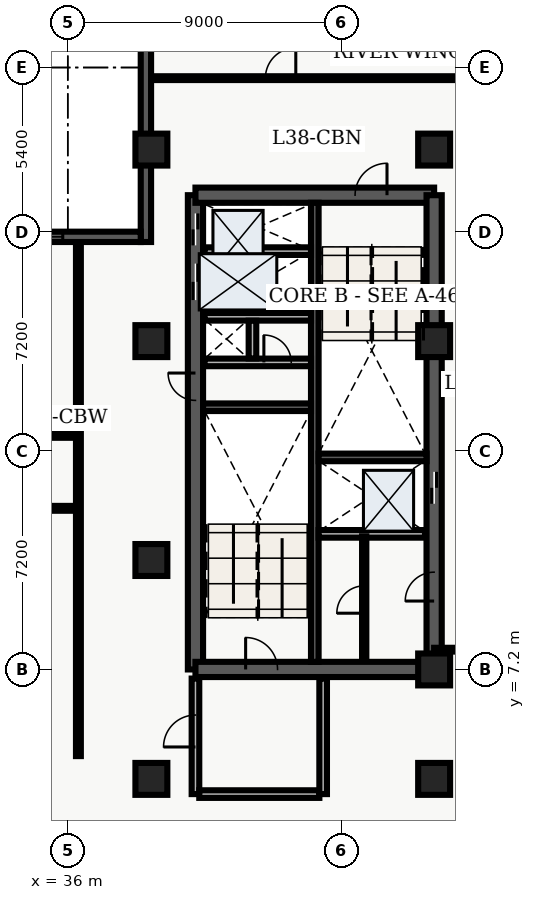
"""IFC4 building model, lengths in metres.
Left out: names, types, materials, properties, quantities, classifications, styles, units other than length and angle.
Written with IfcOpenShell. Run it as: python <this file> out.ifc"""

import sys

from ifc_helpers import new_model, entity, si_unit, converted_unit, direction, frame, origin_with_axes, origin_2d_with_axis, place, context, subcontext, project, spatial, polyline, rectangle, outline, extrude, element, fill, save


model = new_model("IFC4")
c1 = context("Model", 3, precision=1e-05, world=origin_with_axes(), true_north=direction((0.0, 1.0)))
c2 = subcontext(c1, "Body", "Model", "MODEL_VIEW")
j1 = project(units=[si_unit("LENGTHUNIT", "METRE"), converted_unit("PLANEANGLEUNIT", "DEGREE", entity("IfcPlaneAngleMeasure", 0.017), si_unit("PLANEANGLEUNIT", "RADIAN"), dimensions=[0, 0, 0, 0, 0, 0, 0])], contexts=[c1])
p1 = place(None, origin_with_axes())
s1 = spatial("IfcSite", under=j1, at=p1, CompositionType="ELEMENT")
p2 = place(p1, origin_with_axes())
s2 = spatial("IfcBuilding", under=s1, at=p2, CompositionType="ELEMENT")
p3 = place(p2, frame((0.0, 0.0, 156.3), z_axis=(0.0, 0.0, 1.0), x_axis=(1.0, 0.0, 0.0)))
s3 = spatial("IfcBuildingStorey", under=s2, at=p3, CompositionType="ELEMENT", Elevation=156.3)
p4 = place(p3, frame((40.2, 7.2, 0.0), z_axis=(0.0, 0.0, 1.0), x_axis=(0.0, 1.0, 0.0)))
e1 = element("IfcWall", 1, at=p4, inside=s3, PredefinedType="SHEAR", context=c2, shape_type="SweptSolid", body=[
    extrude(outline(polyline([(0.0, -0.25), (15.6, -0.25), (15.6, 0.25), (0.0, 0.25), (0.0, -0.25)])), origin_with_axes(), (0.0, 0.0, 1.0), 3.66),
])
p5 = place(p4, frame((14.475, 0.0, 0.0), z_axis=(0.0, 0.0, 1.0), x_axis=(1.0, 0.0, 0.0)))
e2 = element("IfcOpeningElement", 2, at=p5, cuts=e1, PredefinedType="OPENING", context=c2, shape_type="SweptSolid", body=[
    extrude(rectangle(XDim=1.05, YDim=0.52, at=origin_2d_with_axis()), origin_with_axes(), (0.0, 0.0, 1.0), 2.15),
])
p6 = place(p4, frame((12.75, 0.0, 0.0), z_axis=(0.0, 0.0, 1.0), x_axis=(1.0, 0.0, 0.0)))
e3 = element("IfcOpeningElement", 3, at=p6, cuts=e1, PredefinedType="OPENING", context=c2, shape_type="SweptSolid", body=[
    extrude(rectangle(XDim=1.2, YDim=0.52, at=origin_2d_with_axis()), origin_with_axes(), (0.0, 0.0, 1.0), 2.15),
])
p7 = place(p4, frame((9.3, 0.0, 0.0), z_axis=(0.0, 0.0, 1.0), x_axis=(1.0, 0.0, 0.0)))
e4 = element("IfcOpeningElement", 4, at=p7, cuts=e1, PredefinedType="OPENING", context=c2, shape_type="SweptSolid", body=[
    extrude(rectangle(XDim=0.9, YDim=0.52, at=origin_2d_with_axis()), origin_with_axes(), (0.0, 0.0, 1.0), 2.15),
])
p8 = place(p3, frame((40.2, 7.2, 0.0), z_axis=(0.0, 0.0, 1.0), x_axis=(1.0, 0.0, 0.0)))
e5 = element("IfcWall", 5, at=p8, inside=s3, PredefinedType="SHEAR", context=c2, shape_type="SweptSolid", body=[
    extrude(outline(polyline([(0.0, -0.25), (7.85, -0.25), (7.85, 0.25), (0.0, 0.25), (0.0, -0.25)])), origin_with_axes(), (0.0, 0.0, 1.0), 3.66),
])
p9 = place(p8, frame((2.175, 0.0, 0.0), z_axis=(0.0, 0.0, 1.0), x_axis=(1.0, 0.0, 0.0)))
e6 = element("IfcOpeningElement", 6, at=p9, cuts=e5, PredefinedType="OPENING", context=c2, shape_type="SweptSolid", body=[
    extrude(rectangle(XDim=1.05, YDim=0.52, at=origin_2d_with_axis()), origin_with_axes(), (0.0, 0.0, 1.0), 2.15),
])
p10 = place(p3, frame((40.2, 22.8, 0.0), z_axis=(0.0, 0.0, 1.0), x_axis=(1.0, 0.0, 0.0)))
e7 = element("IfcWall", 7, at=p10, inside=s3, PredefinedType="SHEAR", context=c2, shape_type="SweptSolid", body=[
    extrude(outline(polyline([(0.0, -0.25), (7.85, -0.25), (7.85, 0.25), (0.0, 0.25), (0.0, -0.25)])), origin_with_axes(), (0.0, 0.0, 1.0), 3.66),
])
p11 = place(p10, frame((5.775, 0.0, 0.0), z_axis=(0.0, 0.0, 1.0), x_axis=(1.0, 0.0, 0.0)))
e8 = element("IfcOpeningElement", 8, at=p11, cuts=e7, PredefinedType="OPENING", context=c2, shape_type="SweptSolid", body=[
    extrude(rectangle(XDim=1.05, YDim=0.52, at=origin_2d_with_axis()), origin_with_axes(), (0.0, 0.0, 1.0), 2.15),
])
p12 = place(p3, frame((48.05, 7.2, 0.0), z_axis=(0.0, 0.0, 1.0), x_axis=(0.0, 1.0, 0.0)))
e9 = element("IfcWall", 9, at=p12, inside=s3, PredefinedType="SHEAR", context=c2, shape_type="SweptSolid", body=[
    extrude(outline(polyline([(0.0, -0.25), (15.6, -0.25), (15.6, 0.25), (0.0, 0.25), (0.0, -0.25)])), origin_with_axes(), (0.0, 0.0, 1.0), 3.66),
])
p13 = place(p12, frame((5.975, 0.0, 0.0), z_axis=(0.0, 0.0, 1.0), x_axis=(1.0, 0.0, 0.0)))
e10 = element("IfcOpeningElement", 10, at=p13, cuts=e9, PredefinedType="OPENING", context=c2, shape_type="SweptSolid", body=[
    extrude(rectangle(XDim=1.05, YDim=0.52, at=origin_2d_with_axis()), origin_with_axes(), (0.0, 0.0, 1.0), 2.15),
])
p14 = place(p12, frame((2.725, 0.0, 0.0), z_axis=(0.0, 0.0, 1.0), x_axis=(1.0, 0.0, 0.0)))
e11 = element("IfcOpeningElement", 11, at=p14, cuts=e9, PredefinedType="OPENING", context=c2, shape_type="SweptSolid", body=[
    extrude(rectangle(XDim=0.95, YDim=0.52, at=origin_2d_with_axis()), origin_with_axes(), (0.0, 0.0, 1.0), 2.15),
])
p15 = place(p3, frame((44.125, 7.45, 0.0), z_axis=(0.0, 0.0, 1.0), x_axis=(0.0, 1.0, 0.0)))
e12 = element("IfcWall", 12, at=p15, inside=s3, PredefinedType="SHEAR", context=c2, shape_type="SweptSolid", body=[
    extrude(outline(polyline([(0.0, -0.125), (15.1, -0.125), (15.1, 0.125), (0.0, 0.125), (0.0, -0.125)])), origin_with_axes(), (0.0, 0.0, 1.0), 3.66),
])
for number, where, z_axis, x_axis in (
    (13, (40.45, 15.825, 0.0), (0.0, 0.0, 1.0), (1.0, 0.0, 0.0)),
    (14, (44.25, 14.175, 0.0), (0.0, 0.0, 1.0), (1.0, 0.0, 0.0)),
):
    element("IfcWall", number, at=place(p3, frame(where, z_axis=z_axis, x_axis=x_axis)), inside=s3, PredefinedType="SHEAR", context=c2, shape_type="SweptSolid", body=[
        extrude(outline(polyline([(0.0, -0.125), (3.55, -0.125), (3.55, 0.125), (0.0, 0.125), (0.0, -0.125)])), origin_with_axes(), (0.0, 0.0, 1.0), 3.66),
    ])
p16 = place(p3, frame((40.5, 17.3, 0.0), z_axis=(0.0, 0.0, 1.0), x_axis=(1.0, 0.0, 0.0)))
e15 = element("IfcWall", 15, at=p16, inside=s3, PredefinedType="SOLIDWALL", context=c2, shape_type="SweptSolid", body=[
    extrude(outline(polyline([(0.0, -0.125), (3.5, -0.125), (3.5, 0.125), (0.0, 0.125), (0.0, -0.125)])), origin_with_axes(), (0.0, 0.0, 1.0), 2.7),
])
p17 = place(p16, frame((2.4, 0.0, 0.0), z_axis=(0.0, 0.0, 1.0), x_axis=(1.0, 0.0, 0.0)))
e16 = element("IfcOpeningElement", 16, at=p17, cuts=e15, PredefinedType="OPENING", context=c2, shape_type="SweptSolid", body=[
    extrude(rectangle(XDim=0.9, YDim=0.27, at=origin_2d_with_axis()), origin_with_axes(), (0.0, 0.0, 1.0), 2.15),
])
p18 = place(p3, frame((40.5, 18.8, 0.0), z_axis=(0.0, 0.0, 1.0), x_axis=(1.0, 0.0, 0.0)))
e17 = element("IfcWall", 17, at=p18, inside=s3, PredefinedType="SOLIDWALL", context=c2, shape_type="SweptSolid", body=[
    extrude(outline(polyline([(0.0, -0.125), (3.5, -0.125), (3.5, 0.125), (0.0, 0.125), (0.0, -0.125)])), origin_with_axes(), (0.0, 0.0, 1.0), 2.7),
])
p19 = place(p3, frame((42.075, 17.43, 0.0), z_axis=(0.0, 0.0, 1.0), x_axis=(0.0, 1.0, 0.0)))
e18 = element("IfcWall", 18, at=p19, inside=s3, PredefinedType="SOLIDWALL", context=c2, shape_type="SweptSolid", body=[
    extrude(outline(polyline([(0.0, -0.125), (1.24, -0.125), (1.24, 0.125), (0.0, 0.125), (0.0, -0.125)])), origin_with_axes(), (0.0, 0.0, 1.0), 2.7),
])
p20 = place(p3, frame((40.2, 3.1, 0.0), z_axis=(0.0, 0.0, 1.0), x_axis=(0.0, 1.0, 0.0)))
e19 = element("IfcWall", 19, at=p20, inside=s3, PredefinedType="SOLIDWALL", context=c2, shape_type="SweptSolid", body=[
    extrude(outline(polyline([(0.0, -0.125), (3.8, -0.125), (3.8, 0.125), (0.0, 0.125), (0.0, -0.125)])), origin_with_axes(), (0.0, 0.0, 1.0), 2.7),
])
p21 = place(p20, frame((2.075, 0.0, 0.0), z_axis=(0.0, 0.0, 1.0), x_axis=(1.0, 0.0, 0.0)))
e20 = element("IfcOpeningElement", 20, at=p21, cuts=e19, PredefinedType="OPENING", context=c2, shape_type="SweptSolid", body=[
    extrude(rectangle(XDim=1.05, YDim=0.27, at=origin_2d_with_axis()), origin_with_axes(), (0.0, 0.0, 1.0), 2.15),
])
p22 = place(p3, frame((40.325, 3.1, 0.0), z_axis=(0.0, 0.0, 1.0), x_axis=(1.0, 0.0, 0.0)))
e21 = element("IfcWall", 21, at=p22, inside=s3, PredefinedType="SOLIDWALL", context=c2, shape_type="SweptSolid", body=[
    extrude(outline(polyline([(0.0, -0.125), (3.95, -0.125), (3.95, 0.125), (0.0, 0.125), (0.0, -0.125)])), origin_with_axes(), (0.0, 0.0, 1.0), 2.7),
])
p23 = place(p3, frame((44.4, 3.1, 0.0), z_axis=(0.0, 0.0, 1.0), x_axis=(0.0, 1.0, 0.0)))
e22 = element("IfcWall", 22, at=p23, inside=s3, PredefinedType="SOLIDWALL", context=c2, shape_type="SweptSolid", body=[
    extrude(outline(polyline([(0.0, -0.125), (3.8, -0.125), (3.8, 0.125), (0.0, 0.125), (0.0, -0.125)])), origin_with_axes(), (0.0, 0.0, 1.0), 2.7),
])
for number, where, z_axis, x_axis in (
    (23, (38.75, 3.6, 0.0), (0.0, 0.0, 1.0), (1.0, 0.0, 0.0)),
    (24, (38.75, 10.8, 0.0), (0.0, 0.0, 1.0), (1.0, 0.0, 0.0)),
    (25, (38.75, 18.0, 0.0), (0.0, 0.0, 1.0), (1.0, 0.0, 0.0)),
    (26, (38.75, 24.3, 0.0), (0.0, 0.0, 1.0), (1.0, 0.0, 0.0)),
    (27, (48.05, 3.6, 0.0), (0.0, 0.0, 1.0), (1.0, 0.0, 0.0)),
    (28, (48.05, 7.2, 0.0), (0.0, 0.0, 1.0), (1.0, 0.0, 0.0)),
    (29, (48.05, 18.0, 0.0), (0.0, 0.0, 1.0), (1.0, 0.0, 0.0)),
    (30, (48.05, 24.3, 0.0), (0.0, 0.0, 1.0), (1.0, 0.0, 0.0)),
):
    element("IfcColumn", number, at=place(p3, frame(where, z_axis=z_axis, x_axis=x_axis)), inside=s3, PredefinedType="COLUMN", context=c2, shape_type="SweptSolid", body=[
        extrude(rectangle(XDim=1.05, YDim=1.05, at=origin_2d_with_axis()), origin_with_axes(), (0.0, 0.0, 1.0), 3.9),
    ])
for number, where, z_axis, x_axis in (
    (31, (40.5, 20.96, 0.0), (0.0, 0.0, 1.0), (1.0, 0.0, 0.0)),
    (32, (44.25, 11.66, 0.0), (0.0, 0.0, 1.0), (1.0, 0.0, 0.0)),
):
    element("IfcWall", number, at=place(p3, frame(where, z_axis=z_axis, x_axis=x_axis)), inside=s3, PredefinedType="SOLIDWALL", context=c2, shape_type="SweptSolid", body=[
        extrude(outline(polyline([(0.0, -0.125), (3.5, -0.125), (3.5, 0.125), (0.0, 0.125), (0.0, -0.125)])), origin_with_axes(), (0.0, 0.0, 1.0), 2.7),
    ])
p24 = place(p3, frame((45.75, 7.5, 0.0), z_axis=(0.0, 0.0, 1.0), x_axis=(0.0, 1.0, 0.0)))
e33 = element("IfcWall", 33, at=p24, inside=s3, PredefinedType="PARTITIONING", context=c2, shape_type="SweptSolid", body=[
    extrude(outline(polyline([(0.0, -0.07), (4.08, -0.07), (4.08, 0.07), (0.0, 0.07), (0.0, -0.07)])), origin_with_axes(), (0.0, 0.0, 1.0), 2.7),
])
p25 = place(p24, frame((2.0, 0.0, 0.0), z_axis=(0.0, 0.0, 1.0), x_axis=(1.0, 0.0, 0.0)))
e34 = element("IfcOpeningElement", 34, at=p25, cuts=e33, PredefinedType="OPENING", context=c2, shape_type="SweptSolid", body=[
    extrude(rectangle(XDim=0.9, YDim=0.16, at=origin_2d_with_axis()), origin_with_axes(), (0.0, 0.0, 1.0), 2.15),
])
p26 = place(p3, frame((21.15, 12.5, 0.0), z_axis=(0.0, 0.0, 1.0), x_axis=(1.0, 0.0, 0.0)))
e35 = element("IfcWall", 35, at=p26, inside=s3, PredefinedType="PARTITIONING", context=c2, shape_type="SweptSolid", body=[
    extrude(outline(polyline([(0.0, -0.08), (15.2, -0.08), (15.2, 0.08), (0.0, 0.08), (0.0, -0.08)])), origin_with_axes(), (0.0, 0.0, 1.0), 2.7),
])
p27 = place(p26, frame((2.276, 0.0, 0.0), z_axis=(0.0, 0.0, 1.0), x_axis=(1.0, 0.0, 0.0)))
e36 = element("IfcOpeningElement", 36, at=p27, cuts=e35, PredefinedType="OPENING", context=c2, shape_type="SweptSolid", body=[
    extrude(rectangle(XDim=1.0, YDim=0.18, at=origin_2d_with_axis()), origin_with_axes(), (0.0, 0.0, 1.0), 2.15),
])
p28 = place(p26, frame((6.824, 0.0, 0.0), z_axis=(0.0, 0.0, 1.0), x_axis=(1.0, 0.0, 0.0)))
e37 = element("IfcOpeningElement", 37, at=p28, cuts=e35, PredefinedType="OPENING", context=c2, shape_type="SweptSolid", body=[
    extrude(rectangle(XDim=1.0, YDim=0.18, at=origin_2d_with_axis()), origin_with_axes(), (0.0, 0.0, 1.0), 2.15),
])
p29 = place(p26, frame((12.198, 0.0, 0.0), z_axis=(0.0, 0.0, 1.0), x_axis=(1.0, 0.0, 0.0)))
e38 = element("IfcOpeningElement", 38, at=p29, cuts=e35, PredefinedType="OPENING", context=c2, shape_type="SweptSolid", body=[
    extrude(rectangle(XDim=1.2, YDim=0.18, at=origin_2d_with_axis()), origin_with_axes(), (0.0, 0.0, 1.0), 2.2),
])
p30 = place(p3, frame((21.15, 14.9, 0.0), z_axis=(0.0, 0.0, 1.0), x_axis=(1.0, 0.0, 0.0)))
e39 = element("IfcWall", 39, at=p30, inside=s3, PredefinedType="PARTITIONING", context=c2, shape_type="SweptSolid", body=[
    extrude(outline(polyline([(0.0, -0.08), (15.2, -0.08), (15.2, 0.08), (0.0, 0.08), (0.0, -0.08)])), origin_with_axes(), (0.0, 0.0, 1.0), 2.7),
])
p31 = place(p30, frame((3.506, 0.0, 0.0), z_axis=(0.0, 0.0, 1.0), x_axis=(1.0, 0.0, 0.0)))
e40 = element("IfcOpeningElement", 40, at=p31, cuts=e39, PredefinedType="OPENING", context=c2, shape_type="SweptSolid", body=[
    extrude(rectangle(XDim=1.0, YDim=0.18, at=origin_2d_with_axis()), origin_with_axes(), (0.0, 0.0, 1.0), 2.15),
])
p32 = place(p30, frame((10.976, 0.0, 0.0), z_axis=(0.0, 0.0, 1.0), x_axis=(1.0, 0.0, 0.0)))
e41 = element("IfcOpeningElement", 41, at=p32, cuts=e39, PredefinedType="OPENING", context=c2, shape_type="SweptSolid", body=[
    extrude(rectangle(XDim=1.0, YDim=0.18, at=origin_2d_with_axis()), origin_with_axes(), (0.0, 0.0, 1.0), 2.15),
])
p33 = place(p3, frame((36.35, 4.35, 0.0), z_axis=(0.0, 0.0, 1.0), x_axis=(0.0, 1.0, 0.0)))
e42 = element("IfcWall", 42, at=p33, inside=s3, PredefinedType="PARTITIONING", context=c2, shape_type="SweptSolid", body=[
    extrude(outline(polyline([(0.0, -0.08), (16.95, -0.08), (16.95, 0.08), (0.0, 0.08), (0.0, -0.08)])), origin_with_axes(), (0.0, 0.0, 1.0), 2.7),
])
p34 = place(p3, frame((59.665, 7.85, 0.0), z_axis=(0.0, 0.0, 1.0), x_axis=(-1.0, 0.0, 0.0)))
e43 = element("IfcWall", 43, at=p34, inside=s3, PredefinedType="PARTITIONING", context=c2, shape_type="SweptSolid", body=[
    extrude(outline(polyline([(0.0, -0.062), (11.615, -0.062), (11.615, 0.062), (0.0, 0.062), (0.0, -0.062)])), origin_with_axes(), (0.0, 0.0, 1.0), 2.7),
])
p35 = place(p34, frame((10.315, 0.0, 0.0), z_axis=(0.0, 0.0, 1.0), x_axis=(1.0, 0.0, 0.0)))
e44 = element("IfcOpeningElement", 44, at=p35, cuts=e43, PredefinedType="OPENING", context=c2, shape_type="SweptSolid", body=[
    extrude(rectangle(XDim=1.0, YDim=0.145, at=origin_2d_with_axis()), origin_with_axes(), (0.0, 0.0, 1.0), 2.15),
])
p36 = place(p3, frame((38.735, 26.65, 0.0), z_axis=(0.0, 0.0, 1.0), x_axis=(1.0, 0.0, 0.0)))
e45 = element("IfcWall", 45, at=p36, inside=s3, PredefinedType="PARTITIONING", context=c2, shape_type="SweptSolid", body=[
    extrude(outline(polyline([(0.0, -0.062), (20.905, -0.062), (20.905, 0.062), (0.0, 0.062), (0.0, -0.062)])), origin_with_axes(), (0.0, 0.0, 1.0), 2.7),
])
p37 = place(p36, frame((4.265, 0.0, 0.0), z_axis=(0.0, 0.0, 1.0), x_axis=(1.0, 0.0, 0.0)))
e46 = element("IfcOpeningElement", 46, at=p37, cuts=e45, PredefinedType="OPENING", context=c2, shape_type="SweptSolid", body=[
    extrude(rectangle(XDim=1.0, YDim=0.145, at=origin_2d_with_axis()), origin_with_axes(), (0.0, 0.0, 1.0), 2.15),
])
p38 = place(p3, frame((38.57, 21.26, 0.0), z_axis=(0.0, 0.0, 1.0), x_axis=(0.0, 1.0, 0.0)))
e47 = element("IfcWall", 47, at=p38, inside=s3, PredefinedType="SOLIDWALL", context=c2, shape_type="SweptSolid", body=[
    extrude(outline(polyline([(0.0, -0.17), (7.54, -0.17), (7.54, 0.17), (0.0, 0.17), (0.0, -0.17)])), origin_with_axes(), (0.0, 0.0, 1.0), 3.66),
])
p39 = place(p3, frame((22.712, 21.43, 0.0), z_axis=(0.0, 0.0, 1.0), x_axis=(1.0, 0.0, 0.0)))
e48 = element("IfcWall", 48, at=p39, inside=s3, PredefinedType="SOLIDWALL", context=c2, shape_type="SweptSolid", body=[
    extrude(outline(polyline([(0.0, -0.17), (15.688, -0.17), (15.688, 0.17), (0.0, 0.17), (0.0, -0.17)])), origin_with_axes(), (0.0, 0.0, 1.0), 3.66),
])
p40 = place(p39, frame((3.015, 0.0, 0.45), z_axis=(0.0, 0.0, 1.0), x_axis=(1.0, 0.0, 0.0)))
e49 = element("IfcOpeningElement", 49, at=p40, cuts=e48, PredefinedType="OPENING", context=c2, shape_type="SweptSolid", body=[
    extrude(rectangle(XDim=1.8, YDim=0.36, at=origin_2d_with_axis()), origin_with_axes(), (0.0, 0.0, 1.0), 2.1),
])
p41 = place(p39, frame((7.844, 0.0, 0.45), z_axis=(0.0, 0.0, 1.0), x_axis=(1.0, 0.0, 0.0)))
e50 = element("IfcOpeningElement", 50, at=p41, cuts=e48, PredefinedType="OPENING", context=c2, shape_type="SweptSolid", body=[
    extrude(rectangle(XDim=1.8, YDim=0.36, at=origin_2d_with_axis()), origin_with_axes(), (0.0, 0.0, 1.0), 2.1),
])
p42 = place(p39, frame((12.223, 0.0, 0.45), z_axis=(0.0, 0.0, 1.0), x_axis=(1.0, 0.0, 0.0)))
e51 = element("IfcOpeningElement", 51, at=p42, cuts=e48, PredefinedType="OPENING", context=c2, shape_type="SweptSolid", body=[
    extrude(rectangle(XDim=1.8, YDim=0.36, at=origin_2d_with_axis()), origin_with_axes(), (0.0, 0.0, 1.0), 2.1),
])
p43 = place(p12, frame((5.975, 0.0, 0.0), z_axis=(0.0, 0.0, 1.0), x_axis=(1.0, 0.0, 0.0)))
e52 = element("IfcDoor", 52, at=p43, inside=s3, OperationType="SLIDING_TO_LEFT", PredefinedType="DOOR", context=c2, shape_type="SweptSolid", body=[
    extrude(rectangle(XDim=1.05, YDim=0.09, at=origin_2d_with_axis()), origin_with_axes(), (0.0, 0.0, 1.0), 2.15),
])
fill(e10, e52)
p44 = place(p4, frame((14.475, 0.0, 0.0), z_axis=(0.0, 0.0, 1.0), x_axis=(1.0, 0.0, 0.0)))
e53 = element("IfcDoor", 53, at=p44, inside=s3, OperationType="SLIDING_TO_RIGHT", PredefinedType="DOOR", context=c2, shape_type="SweptSolid", body=[
    extrude(rectangle(XDim=1.05, YDim=0.09, at=origin_2d_with_axis()), origin_with_axes(), (0.0, 0.0, 1.0), 2.15),
])
fill(e2, e53)
p45 = place(p4, frame((12.75, 0.0, 0.0), z_axis=(0.0, 0.0, 1.0), x_axis=(1.0, 0.0, 0.0)))
e54 = element("IfcDoor", 54, at=p45, inside=s3, OperationType="DOUBLE_DOOR_SLIDING", PredefinedType="DOOR", context=c2, shape_type="SweptSolid", body=[
    extrude(rectangle(XDim=1.2, YDim=0.09, at=origin_2d_with_axis()), origin_with_axes(), (0.0, 0.0, 1.0), 2.15),
])
fill(e3, e54)
p46 = place(p4, frame((9.3, 0.0, 0.0), z_axis=(0.0, 0.0, 1.0), x_axis=(1.0, 0.0, 0.0)))
e55 = element("IfcDoor", 55, at=p46, inside=s3, OperationType="SINGLE_SWING_RIGHT", PredefinedType="DOOR", context=c2, shape_type="SweptSolid", body=[
    extrude(rectangle(XDim=0.9, YDim=0.09, at=origin_2d_with_axis()), origin_with_axes(), (0.0, 0.0, 1.0), 2.15),
])
fill(e4, e55)
p47 = place(p16, frame((2.4, 0.0, 0.0), z_axis=(0.0, 0.0, 1.0), x_axis=(1.0, 0.0, 0.0)))
e56 = element("IfcDoor", 56, at=p47, inside=s3, OperationType="SINGLE_SWING_LEFT", PredefinedType="DOOR", context=c2, shape_type="SweptSolid", body=[
    extrude(rectangle(XDim=0.9, YDim=0.09, at=origin_2d_with_axis()), origin_with_axes(), (0.0, 0.0, 1.0), 2.15),
])
fill(e16, e56)
p48 = place(p8, frame((2.175, 0.0, 0.0), z_axis=(0.0, 0.0, 1.0), x_axis=(1.0, 0.0, 0.0)))
e57 = element("IfcDoor", 57, at=p48, inside=s3, OperationType="SINGLE_SWING_LEFT", PredefinedType="DOOR", context=c2, shape_type="SweptSolid", body=[
    extrude(rectangle(XDim=1.05, YDim=0.09, at=origin_2d_with_axis()), origin_with_axes(), (0.0, 0.0, 1.0), 2.15),
])
fill(e6, e57)
p49 = place(p10, frame((5.775, 0.0, 0.0), z_axis=(0.0, 0.0, 1.0), x_axis=(1.0, 0.0, 0.0)))
e58 = element("IfcDoor", 58, at=p49, inside=s3, OperationType="SINGLE_SWING_RIGHT", PredefinedType="DOOR", context=c2, shape_type="SweptSolid", body=[
    extrude(rectangle(XDim=1.05, YDim=0.09, at=origin_2d_with_axis()), origin_with_axes(), (0.0, 0.0, 1.0), 2.15),
])
fill(e8, e58)
p50 = place(p20, frame((2.075, 0.0, 0.0), z_axis=(0.0, 0.0, 1.0), x_axis=(1.0, 0.0, 0.0)))
e59 = element("IfcDoor", 59, at=p50, inside=s3, OperationType="SINGLE_SWING_LEFT", PredefinedType="DOOR", context=c2, shape_type="SweptSolid", body=[
    extrude(rectangle(XDim=1.05, YDim=0.09, at=origin_2d_with_axis()), origin_with_axes(), (0.0, 0.0, 1.0), 2.15),
])
fill(e20, e59)
p51 = place(p24, frame((2.0, 0.0, 0.0), z_axis=(0.0, 0.0, 1.0), x_axis=(1.0, 0.0, 0.0)))
e60 = element("IfcDoor", 60, at=p51, inside=s3, OperationType="SINGLE_SWING_LEFT", PredefinedType="DOOR", context=c2, shape_type="SweptSolid", body=[
    extrude(rectangle(XDim=0.9, YDim=0.084, at=origin_2d_with_axis()), origin_with_axes(), (0.0, 0.0, 1.0), 2.15),
])
fill(e34, e60)
p52 = place(p12, frame((2.725, 0.0, 0.0), z_axis=(0.0, 0.0, 1.0), x_axis=(1.0, 0.0, 0.0)))
e61 = element("IfcDoor", 61, at=p52, inside=s3, OperationType="SINGLE_SWING_LEFT", PredefinedType="DOOR", context=c2, shape_type="SweptSolid", body=[
    extrude(rectangle(XDim=0.95, YDim=0.09, at=origin_2d_with_axis()), origin_with_axes(), (0.0, 0.0, 1.0), 2.15),
])
fill(e11, e61)
p53 = place(p36, frame((4.265, 0.0, 0.0), z_axis=(0.0, 0.0, 1.0), x_axis=(1.0, 0.0, 0.0)))
e62 = element("IfcDoor", 62, at=p53, inside=s3, OperationType="SINGLE_SWING_RIGHT", PredefinedType="DOOR", context=c2, shape_type="SweptSolid", body=[
    extrude(rectangle(XDim=1.0, YDim=0.075, at=origin_2d_with_axis()), origin_with_axes(), (0.0, 0.0, 1.0), 2.15),
])
fill(e46, e62)
p54 = place(p39, frame((12.223, 0.0, 0.45), z_axis=(0.0, 0.0, 1.0), x_axis=(1.0, 0.0, 0.0)))
e63 = element("IfcWindow", 63, at=p54, inside=s3, PredefinedType="WINDOW", context=c2, shape_type="SweptSolid", body=[
    extrude(rectangle(XDim=1.8, YDim=0.09, at=origin_2d_with_axis()), origin_with_axes(), (0.0, 0.0, 1.0), 2.1),
])
fill(e51, e63)
save(model, sys.argv[1])
